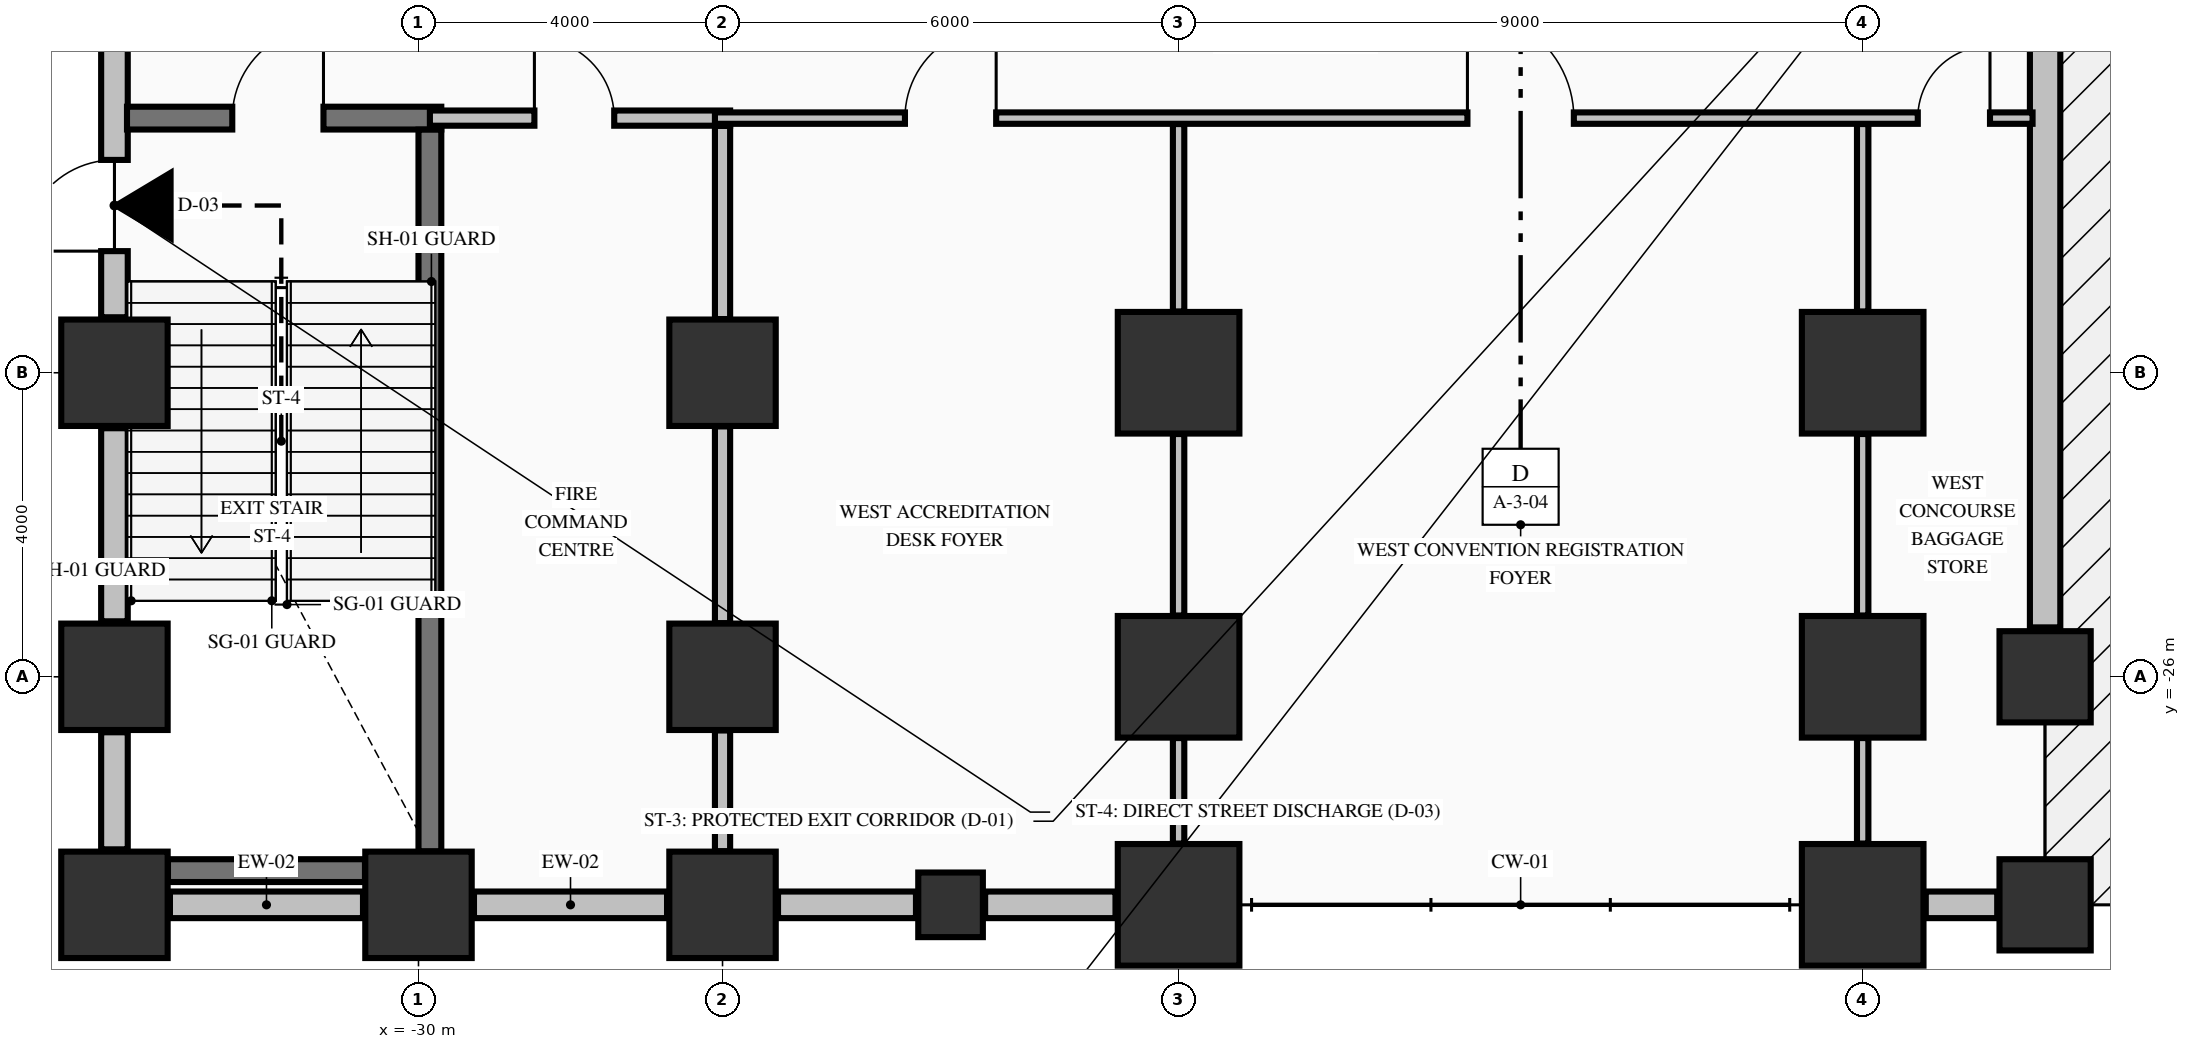
"""IFC4 building model, lengths in metres.
Left out: names, types, materials, properties, quantities, classifications, styles, units other than length and angle.
Written with IfcOpenShell. Run it as: python <this file> out.ifc"""

import sys

from ifc_helpers import new_model, si_unit, direction, frame, frame_2d, origin, origin_2d, place, context, subcontext, project, spatial, rectangle, extrude, element, fill, save


model = new_model("IFC4")
c1 = context("Model", 3, precision=1e-05, world=origin(), true_north=direction((0.0, 1.0)))
c2 = subcontext(c1, "Body", "Model", "MODEL_VIEW")
j1 = project(units=[si_unit("LENGTHUNIT", "METRE"), si_unit("PLANEANGLEUNIT", "RADIAN")], contexts=[c1])
p1 = place(None, origin())
s1 = spatial("IfcSite", under=j1, at=p1, CompositionType="ELEMENT")
p2 = place(p1, origin())
s2 = spatial("IfcBuilding", under=s1, at=p2, CompositionType="ELEMENT")
p3 = place(p2, origin())
s3 = spatial("IfcBuildingStorey", under=s2, at=p3, CompositionType="ELEMENT", Elevation=0.0)
for number, where, z_axis, x_axis in (
    (1, (-34.0, -29.0, 0.0), (0.0, 0.0, 1.0), (1.0, 0.0, 0.0)),
    (2, (-34.0, -26.0, 0.0), (0.0, 0.0, 1.0), (1.0, 0.0, 0.0)),
    (3, (-34.0, -22.0, 0.0), (0.0, 0.0, 1.0), (1.0, 0.0, 0.0)),
    (4, (-30.0, -29.0, 0.0), (0.0, 0.0, 1.0), (1.0, 0.0, 0.0)),
    (5, (-26.0, -29.0, 0.0), (0.0, 0.0, 1.0), (1.0, 0.0, 0.0)),
    (6, (-26.0, -26.0, 0.0), (0.0, 0.0, 1.0), (1.0, 0.0, 0.0)),
    (7, (-26.0, -22.0, 0.0), (0.0, 0.0, 1.0), (1.0, 0.0, 0.0)),
):
    element("IfcColumn", number, at=place(p3, frame(where, z_axis=z_axis, x_axis=x_axis)), inside=s3, PredefinedType="COLUMN", context=c2, shape_type="SweptSolid", body=[
        extrude(rectangle(XDim=1.4, YDim=1.4, at=origin_2d()), origin(), (0.0, 0.0, 1.0), 5.09),
    ])
for number, where, z_axis, x_axis in (
    (8, (-20.0, -29.0, 0.0), (0.0, 0.0, 1.0), (1.0, 0.0, 0.0)),
    (9, (-20.0, -26.0, 0.0), (0.0, 0.0, 1.0), (1.0, 0.0, 0.0)),
    (10, (-20.0, -22.0, 0.0), (0.0, 0.0, 1.0), (1.0, 0.0, 0.0)),
    (11, (-11.0, -29.0, 0.0), (0.0, 0.0, 1.0), (1.0, 0.0, 0.0)),
    (12, (-11.0, -26.0, 0.0), (0.0, 0.0, 1.0), (1.0, 0.0, 0.0)),
    (13, (-11.0, -22.0, 0.0), (0.0, 0.0, 1.0), (1.0, 0.0, 0.0)),
):
    element("IfcColumn", number, at=place(p3, frame(where, z_axis=z_axis, x_axis=x_axis)), inside=s3, PredefinedType="COLUMN", context=c2, shape_type="SweptSolid", body=[
        extrude(rectangle(XDim=1.6, YDim=1.6, at=origin_2d()), origin(), (0.0, 0.0, 1.0), 5.09),
    ])
for number, where, z_axis, x_axis in (
    (14, (-8.6, -29.0, 0.0), (0.0, 0.0, 1.0), (1.0, 0.0, 0.0)),
    (15, (-8.6, -26.0, 0.0), (0.0, 0.0, 1.0), (1.0, 0.0, 0.0)),
):
    element("IfcColumn", number, at=place(p3, frame(where, z_axis=z_axis, x_axis=x_axis)), inside=s3, PredefinedType="COLUMN", context=c2, shape_type="SweptSolid", body=[
        extrude(rectangle(XDim=1.2, YDim=1.2, at=origin_2d()), origin(), (0.0, 0.0, 1.0), 5.09),
    ])
p4 = place(p3, frame((-23.0, -29.0, 0.0), z_axis=(0.0, 0.0, 1.0), x_axis=(1.0, 0.0, 0.0)))
e16 = element("IfcColumn", 16, at=p4, inside=s3, PredefinedType="PILASTER", context=c2, shape_type="SweptSolid", body=[
    extrude(rectangle(XDim=0.85, YDim=0.85, at=origin_2d()), origin(), (0.0, 0.0, 1.0), 5.09),
])
for number, where, z_axis, x_axis in (
    (17, (-33.27, -29.0, 0.0), (0.0, 0.0, 1.0), (1.0, 0.0, 0.0)),
    (18, (-29.27, -29.0, 0.0), (0.0, 0.0, 1.0), (1.0, 0.0, 0.0)),
):
    element("IfcWall", number, at=place(p3, frame(where, z_axis=z_axis, x_axis=x_axis)), inside=s3, PredefinedType="STANDARD", context=c2, shape_type="SweptSolid", body=[
        extrude(rectangle(XDim=2.54, YDim=0.35, at=frame_2d((1.27, 0.0))), origin(), (0.0, 0.0, 1.0), 4.482),
    ])
p5 = place(p3, frame((-25.27, -29.0, 0.0), z_axis=(0.0, 0.0, 1.0), x_axis=(1.0, 0.0, 0.0)))
e19 = element("IfcWall", 19, at=p5, inside=s3, PredefinedType="STANDARD", context=c2, shape_type="SweptSolid", body=[
    extrude(rectangle(XDim=1.815, YDim=0.35, at=frame_2d((0.907, 0.0))), origin(), (0.0, 0.0, 1.0), 4.482),
])
p6 = place(p3, frame((-22.545, -29.0, 0.0), z_axis=(0.0, 0.0, 1.0), x_axis=(1.0, 0.0, 0.0)))
e20 = element("IfcWall", 20, at=p6, inside=s3, PredefinedType="STANDARD", context=c2, shape_type="SweptSolid", body=[
    extrude(rectangle(XDim=1.715, YDim=0.35, at=frame_2d((0.857, 0.0))), origin(), (0.0, 0.0, 1.0), 4.482),
])
p7 = place(p3, frame((-10.17, -29.0, 0.0), z_axis=(0.0, 0.0, 1.0), x_axis=(1.0, 0.0, 0.0)))
e21 = element("IfcWall", 21, at=p7, inside=s3, PredefinedType="STANDARD", context=c2, shape_type="SweptSolid", body=[
    extrude(rectangle(XDim=0.94, YDim=0.35, at=frame_2d((0.47, 0.0))), origin(), (0.0, 0.0, 1.0), 4.482),
])
p8 = place(p3, frame((-34.0, -28.27, 0.0), z_axis=(0.0, 0.0, 1.0), x_axis=(0.0, 1.0, 0.0)))
e22 = element("IfcWall", 22, at=p8, inside=s3, PredefinedType="STANDARD", context=c2, shape_type="SweptSolid", body=[
    extrude(rectangle(XDim=1.54, YDim=0.35, at=frame_2d((0.77, 0.0))), origin(), (0.0, 0.0, 1.0), 5.09),
])
p9 = place(p3, frame((-34.0, -25.27, 0.0), z_axis=(0.0, 0.0, 1.0), x_axis=(0.0, 1.0, 0.0)))
e23 = element("IfcWall", 23, at=p9, inside=s3, PredefinedType="STANDARD", context=c2, shape_type="SweptSolid", body=[
    extrude(rectangle(XDim=2.54, YDim=0.35, at=frame_2d((1.27, 0.0))), origin(), (0.0, 0.0, 1.0), 5.09),
])
p10 = place(p3, frame((-34.0, -21.27, 0.0), z_axis=(0.0, 0.0, 1.0), x_axis=(0.0, 1.0, 0.0)))
e24 = element("IfcWall", 24, at=p10, inside=s3, PredefinedType="STANDARD", context=c2, shape_type="SweptSolid", body=[
    extrude(rectangle(XDim=4.54, YDim=0.35, at=frame_2d((2.27, 0.0))), origin(), (0.0, 0.0, 1.0), 5.09),
])
p11 = place(p10, frame((0.87, 0.0, 0.0)))
e25 = element("IfcOpeningElement", 25, at=p11, cuts=e24, PredefinedType="OPENING", context=c2, shape_type="SweptSolid", body=[
    extrude(rectangle(XDim=1.2, YDim=2.2, at=frame_2d((0.6, 1.1))), frame((0.0, 0.185, 0.0), z_axis=(0.0, -1.0, 0.0), x_axis=(1.0, 0.0, 0.0)), (0.0, 0.0, 1.0), 0.37),
])
p12 = place(p3, frame((-8.6, -25.35, 0.0), z_axis=(0.0, 0.0, 1.0), x_axis=(0.0, 1.0, 0.0)))
e26 = element("IfcWall", 26, at=p12, inside=s3, PredefinedType="STANDARD", context=c2, shape_type="SweptSolid", body=[
    extrude(rectangle(XDim=24.7, YDim=0.4, at=frame_2d((12.35, 0.0))), origin(), (0.0, 0.0, 1.0), 4.132),
])
p13 = place(p12, frame((10.5, 0.0, 0.0)))
e27 = element("IfcOpeningElement", 27, at=p13, cuts=e26, PredefinedType="OPENING", context=c2, shape_type="SweptSolid", body=[
    extrude(rectangle(XDim=2.4, YDim=2.6, at=frame_2d((1.2, 1.3))), frame((0.0, 0.21, 0.0), z_axis=(0.0, -1.0, 0.0), x_axis=(1.0, 0.0, 0.0)), (0.0, 0.0, 1.0), 0.42),
])
p14 = place(p3, frame((-33.296, -28.55, 0.0), z_axis=(0.0, 0.0, 1.0), x_axis=(1.0, 0.0, 0.0)))
e28 = element("IfcWall", 28, at=p14, inside=s3, PredefinedType="SHEAR", context=c2, shape_type="SweptSolid", body=[
    extrude(rectangle(XDim=2.592, YDim=0.3, at=frame_2d((1.296, 0.0))), origin(), (0.0, 0.0, 1.0), 5.09),
])
p15 = place(p3, frame((-33.835, -18.65, 0.0), z_axis=(0.0, 0.0, 1.0), x_axis=(1.0, 0.0, 0.0)))
e29 = element("IfcWall", 29, at=p15, inside=s3, PredefinedType="SHEAR", context=c2, shape_type="SweptSolid", body=[
    extrude(rectangle(XDim=4.135, YDim=0.3, at=frame_2d((2.067, 0.0))), origin(), (0.0, 0.0, 1.0), 5.09),
])
p16 = place(p15, frame((1.385, 0.0, 0.0)))
e30 = element("IfcOpeningElement", 30, at=p16, cuts=e29, PredefinedType="OPENING", context=c2, shape_type="SweptSolid", body=[
    extrude(rectangle(XDim=1.2, YDim=2.15, at=frame_2d((0.6, 1.075))), frame((0.0, 0.16, 0.0), z_axis=(0.0, -1.0, 0.0), x_axis=(1.0, 0.0, 0.0)), (0.0, 0.0, 1.0), 0.32),
])
p17 = place(p3, frame((-29.85, -18.65, 0.0), z_axis=(0.0, 0.0, 1.0), x_axis=(1.0, 0.0, 0.0)))
e31 = element("IfcWall", 31, at=p17, inside=s3, PredefinedType="PARTITIONING", context=c2, shape_type="SweptSolid", body=[
    extrude(rectangle(XDim=3.95, YDim=0.2, at=frame_2d((1.975, 0.0))), origin(), (0.0, 0.0, 1.0), 5.09),
])
p18 = place(p17, frame((1.375, 0.0, 0.0)))
e32 = element("IfcOpeningElement", 32, at=p18, cuts=e31, PredefinedType="OPENING", context=c2, shape_type="SweptSolid", body=[
    extrude(rectangle(XDim=1.05, YDim=2.15, at=frame_2d((0.525, 1.075))), frame((0.0, 0.11, 0.0), z_axis=(0.0, -1.0, 0.0), x_axis=(1.0, 0.0, 0.0)), (0.0, 0.0, 1.0), 0.22),
])
p19 = place(p3, frame((-26.1, -18.65, 0.0), z_axis=(0.0, 0.0, 1.0), x_axis=(1.0, 0.0, 0.0)))
e33 = element("IfcWall", 33, at=p19, inside=s3, PredefinedType="PARTITIONING", context=c2, shape_type="SweptSolid", body=[
    extrude(rectangle(XDim=17.335, YDim=0.15, at=frame_2d((8.667, 0.0))), origin(), (0.0, 0.0, 1.0), 5.09),
])
p20 = place(p19, frame((2.5, 0.0, 0.0)))
e34 = element("IfcOpeningElement", 34, at=p20, cuts=e33, PredefinedType="OPENING", context=c2, shape_type="SweptSolid", body=[
    extrude(rectangle(XDim=1.2, YDim=2.15, at=frame_2d((0.6, 1.075))), frame((0.0, 0.085, 0.0), z_axis=(0.0, -1.0, 0.0), x_axis=(1.0, 0.0, 0.0)), (0.0, 0.0, 1.0), 0.17),
])
p21 = place(p19, frame((9.9, 0.0, 0.0)))
e35 = element("IfcOpeningElement", 35, at=p21, cuts=e33, PredefinedType="OPENING", context=c2, shape_type="SweptSolid", body=[
    extrude(rectangle(XDim=1.4, YDim=2.2, at=frame_2d((0.7, 1.1))), frame((0.0, 0.085, 0.0), z_axis=(0.0, -1.0, 0.0), x_axis=(1.0, 0.0, 0.0)), (0.0, 0.0, 1.0), 0.17),
])
p22 = place(p19, frame((15.825, 0.0, 0.0)))
e36 = element("IfcOpeningElement", 36, at=p22, cuts=e33, PredefinedType="OPENING", context=c2, shape_type="SweptSolid", body=[
    extrude(rectangle(XDim=0.95, YDim=2.15, at=frame_2d((0.475, 1.075))), frame((0.0, 0.085, 0.0), z_axis=(0.0, -1.0, 0.0), x_axis=(1.0, 0.0, 0.0)), (0.0, 0.0, 1.0), 0.17),
])
p23 = place(p3, frame((-29.85, -28.296, 0.0), z_axis=(0.0, 0.0, 1.0), x_axis=(0.0, 1.0, 0.0)))
e37 = element("IfcWall", 37, at=p23, inside=s3, PredefinedType="SHEAR", context=c2, shape_type="SweptSolid", body=[
    extrude(rectangle(XDim=9.494, YDim=0.3, at=frame_2d((4.747, 0.0))), origin(), (0.0, 0.0, 1.0), 5.09),
])
p24 = place(p3, frame((-26.0, -28.294, 0.0), z_axis=(0.0, 0.0, 1.0), x_axis=(0.0, 1.0, 0.0)))
e38 = element("IfcWall", 38, at=p24, inside=s3, PredefinedType="PARTITIONING", context=c2, shape_type="SweptSolid", body=[
    extrude(rectangle(XDim=1.588, YDim=0.2, at=frame_2d((0.794, 0.0))), origin(), (0.0, 0.0, 1.0), 4.132),
])
p25 = place(p3, frame((-26.0, -25.294, 0.0), z_axis=(0.0, 0.0, 1.0), x_axis=(0.0, 1.0, 0.0)))
e39 = element("IfcWall", 39, at=p25, inside=s3, PredefinedType="PARTITIONING", context=c2, shape_type="SweptSolid", body=[
    extrude(rectangle(XDim=2.588, YDim=0.2, at=frame_2d((1.294, 0.0))), origin(), (0.0, 0.0, 1.0), 4.132),
])
p26 = place(p3, frame((-26.0, -21.294, 0.0), z_axis=(0.0, 0.0, 1.0), x_axis=(0.0, 1.0, 0.0)))
e40 = element("IfcWall", 40, at=p26, inside=s3, PredefinedType="PARTITIONING", context=c2, shape_type="SweptSolid", body=[
    extrude(rectangle(XDim=2.541, YDim=0.2, at=frame_2d((1.271, 0.0))), origin(), (0.0, 0.0, 1.0), 4.132),
])
p27 = place(p3, frame((-20.0, -28.194, 0.0), z_axis=(0.0, 0.0, 1.0), x_axis=(0.0, 1.0, 0.0)))
e41 = element("IfcWall", 41, at=p27, inside=s3, PredefinedType="PARTITIONING", context=c2, shape_type="SweptSolid", body=[
    extrude(rectangle(XDim=1.388, YDim=0.15, at=frame_2d((0.694, 0.0))), origin(), (0.0, 0.0, 1.0), 4.132),
])
p28 = place(p3, frame((-20.0, -25.194, 0.0), z_axis=(0.0, 0.0, 1.0), x_axis=(0.0, 1.0, 0.0)))
e42 = element("IfcWall", 42, at=p28, inside=s3, PredefinedType="PARTITIONING", context=c2, shape_type="SweptSolid", body=[
    extrude(rectangle(XDim=2.388, YDim=0.15, at=frame_2d((1.194, 0.0))), origin(), (0.0, 0.0, 1.0), 4.132),
])
p29 = place(p3, frame((-20.0, -21.194, 0.0), z_axis=(0.0, 0.0, 1.0), x_axis=(0.0, 1.0, 0.0)))
e43 = element("IfcWall", 43, at=p29, inside=s3, PredefinedType="PARTITIONING", context=c2, shape_type="SweptSolid", body=[
    extrude(rectangle(XDim=2.466, YDim=0.15, at=frame_2d((1.233, 0.0))), origin(), (0.0, 0.0, 1.0), 4.132),
])
p30 = place(p3, frame((-11.0, -28.194, 0.0), z_axis=(0.0, 0.0, 1.0), x_axis=(0.0, 1.0, 0.0)))
e44 = element("IfcWall", 44, at=p30, inside=s3, PredefinedType="PARTITIONING", context=c2, shape_type="SweptSolid", body=[
    extrude(rectangle(XDim=1.388, YDim=0.15, at=frame_2d((0.694, 0.0))), origin(), (0.0, 0.0, 1.0), 4.132),
])
p31 = place(p3, frame((-11.0, -25.194, 0.0), z_axis=(0.0, 0.0, 1.0), x_axis=(0.0, 1.0, 0.0)))
e45 = element("IfcWall", 45, at=p31, inside=s3, PredefinedType="PARTITIONING", context=c2, shape_type="SweptSolid", body=[
    extrude(rectangle(XDim=2.388, YDim=0.15, at=frame_2d((1.194, 0.0))), origin(), (0.0, 0.0, 1.0), 4.132),
])
p32 = place(p3, frame((-11.0, -21.194, 0.0), z_axis=(0.0, 0.0, 1.0), x_axis=(0.0, 1.0, 0.0)))
e46 = element("IfcWall", 46, at=p32, inside=s3, PredefinedType="PARTITIONING", context=c2, shape_type="SweptSolid", body=[
    extrude(rectangle(XDim=2.466, YDim=0.15, at=frame_2d((1.233, 0.0))), origin(), (0.0, 0.0, 1.0), 4.132),
])
p33 = place(p11, origin())
e47 = element("IfcDoor", 47, at=p33, inside=s3, OperationType="SINGLE_SWING_LEFT", PredefinedType="DOOR", context=c2, shape_type="SweptSolid", body=[
    extrude(rectangle(XDim=1.2, YDim=2.2, at=frame_2d((0.6, 1.1))), frame((0.0, 0.025, 0.0), z_axis=(0.0, -1.0, 0.0), x_axis=(1.0, 0.0, 0.0)), (0.0, 0.0, 1.0), 0.05),
])
fill(e25, e47)
p34 = place(p16, origin())
e48 = element("IfcDoor", 48, at=p34, inside=s3, OperationType="SINGLE_SWING_RIGHT", PredefinedType="DOOR", context=c2, shape_type="SweptSolid", body=[
    extrude(rectangle(XDim=1.2, YDim=2.15, at=frame_2d((0.6, 1.075))), frame((0.0, 0.025, 0.0), z_axis=(0.0, -1.0, 0.0), x_axis=(1.0, 0.0, 0.0)), (0.0, 0.0, 1.0), 0.05),
])
fill(e30, e48)
p35 = place(p18, origin())
e49 = element("IfcDoor", 49, at=p35, inside=s3, OperationType="SINGLE_SWING_LEFT", PredefinedType="DOOR", context=c2, shape_type="SweptSolid", body=[
    extrude(rectangle(XDim=1.05, YDim=2.15, at=frame_2d((0.525, 1.075))), frame((0.0, 0.025, 0.0), z_axis=(0.0, -1.0, 0.0), x_axis=(1.0, 0.0, 0.0)), (0.0, 0.0, 1.0), 0.05),
])
fill(e32, e49)
p36 = place(p20, origin())
e50 = element("IfcDoor", 50, at=p36, inside=s3, OperationType="SINGLE_SWING_RIGHT", PredefinedType="DOOR", context=c2, shape_type="SweptSolid", body=[
    extrude(rectangle(XDim=1.2, YDim=2.15, at=frame_2d((0.6, 1.075))), frame((0.0, 0.025, 0.0), z_axis=(0.0, -1.0, 0.0), x_axis=(1.0, 0.0, 0.0)), (0.0, 0.0, 1.0), 0.05),
])
fill(e34, e50)
p37 = place(p21, origin())
e51 = element("IfcDoor", 51, at=p37, inside=s3, OperationType="SINGLE_SWING_LEFT", PredefinedType="DOOR", context=c2, shape_type="SweptSolid", body=[
    extrude(rectangle(XDim=1.4, YDim=2.2, at=frame_2d((0.7, 1.1))), frame((0.0, 0.025, 0.0), z_axis=(0.0, -1.0, 0.0), x_axis=(1.0, 0.0, 0.0)), (0.0, 0.0, 1.0), 0.05),
])
fill(e35, e51)
p38 = place(p22, origin())
e52 = element("IfcDoor", 52, at=p38, inside=s3, OperationType="SINGLE_SWING_RIGHT", PredefinedType="DOOR", context=c2, shape_type="SweptSolid", body=[
    extrude(rectangle(XDim=0.95, YDim=2.15, at=frame_2d((0.475, 1.075))), frame((0.0, 0.025, 0.0), z_axis=(0.0, -1.0, 0.0), x_axis=(1.0, 0.0, 0.0)), (0.0, 0.0, 1.0), 0.05),
])
fill(e36, e52)
save(model, sys.argv[1])
